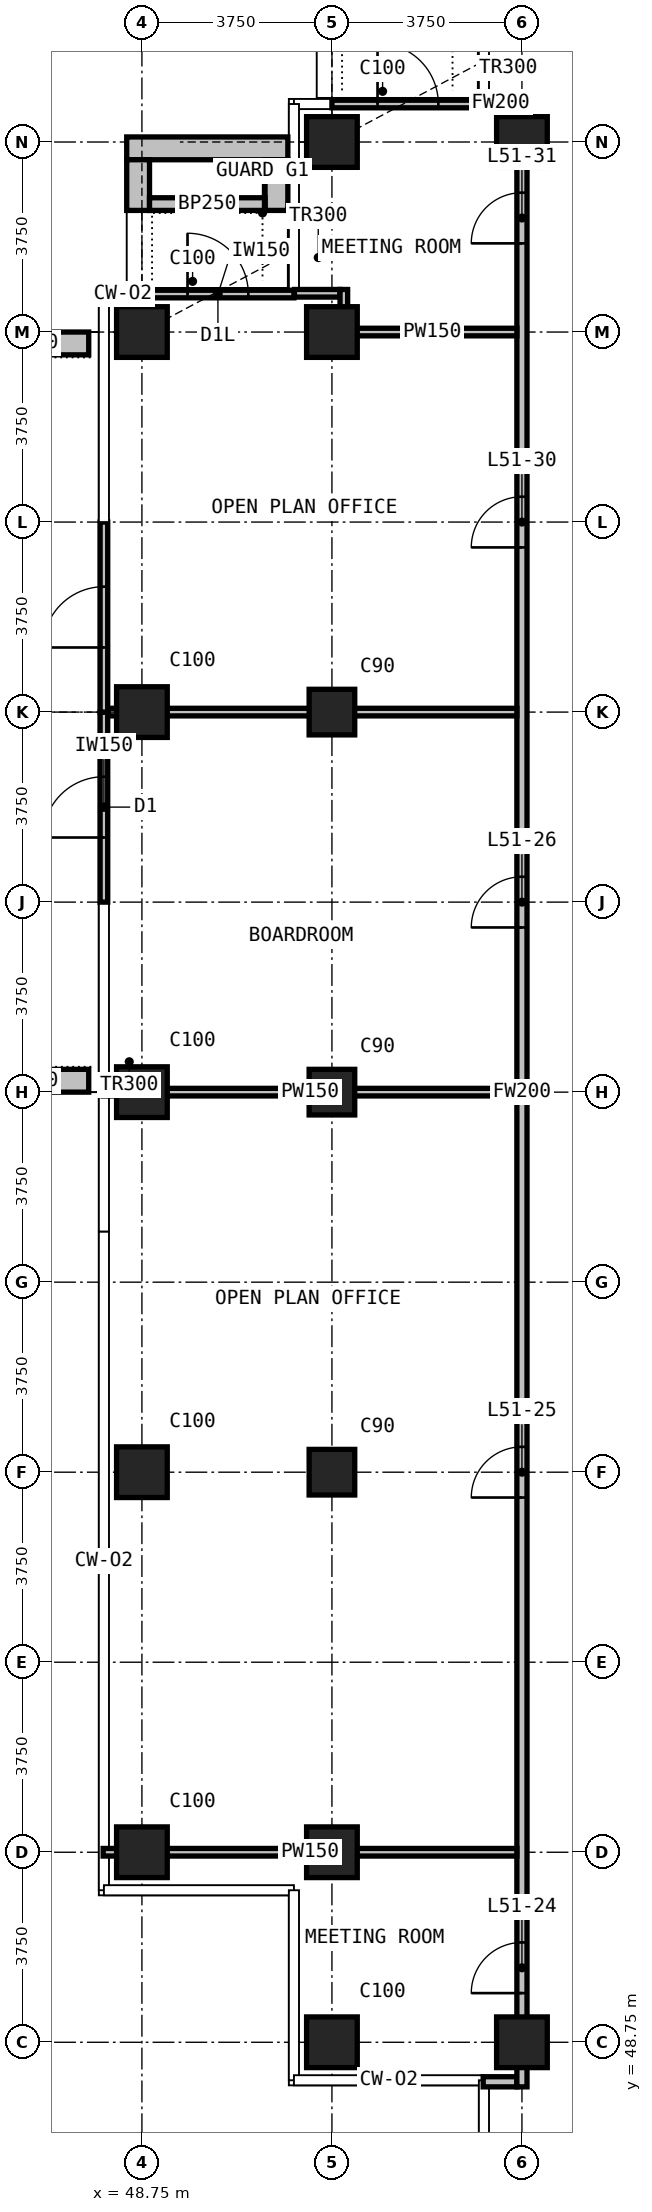
"""IFC4 building model, lengths in metres.
Left out: names, types, materials, properties, quantities, classifications, styles, units other than length and angle.
Written with IfcOpenShell. Run it as: python <this file> out.ifc"""

import sys

from ifc_helpers import new_model, si_unit, direction, frame, frame_2d, origin, origin_2d, place, context, subcontext, project, spatial, rectangle, extrude, element, fill, save


model = new_model("IFC4")
c1 = context("Model", 3, precision=1e-05, world=origin(), true_north=direction((0.0, 1.0)))
c2 = subcontext(c1, "Body", "Model", "MODEL_VIEW")
j1 = project(units=[si_unit("LENGTHUNIT", "METRE"), si_unit("PLANEANGLEUNIT", "RADIAN")], contexts=[c1])
p1 = place(None, origin())
s1 = spatial("IfcSite", under=j1, at=p1, CompositionType="ELEMENT")
p2 = place(p1, origin())
s2 = spatial("IfcBuilding", under=s1, at=p2, CompositionType="ELEMENT")
p3 = place(p2, frame((0.0, 0.0, 199.5)))
s3 = spatial("IfcBuildingStorey", under=s2, at=p3, CompositionType="ELEMENT", Elevation=199.5)
for number, where, z_axis, x_axis in (
    (1, (48.75, 52.5, 0.0), (0.0, 0.0, 1.0), (1.0, 0.0, 0.0)),
    (2, (48.75, 60.0, 0.0), (0.0, 0.0, 1.0), (1.0, 0.0, 0.0)),
    (3, (48.75, 67.5, 0.0), (0.0, 0.0, 1.0), (1.0, 0.0, 0.0)),
    (4, (48.75, 75.0, 0.0), (0.0, 0.0, 1.0), (1.0, 0.0, 0.0)),
    (5, (48.75, 82.5, 0.0), (0.0, 0.0, 1.0), (1.0, 0.0, 0.0)),
    (6, (52.5, 48.75, 0.0), (0.0, 0.0, 1.0), (1.0, 0.0, 0.0)),
    (7, (52.5, 52.5, 0.0), (0.0, 0.0, 1.0), (1.0, 0.0, 0.0)),
):
    element("IfcColumn", number, at=place(p3, frame(where, z_axis=z_axis, x_axis=x_axis)), inside=s3, PredefinedType="COLUMN", context=c2, shape_type="SweptSolid", body=[
        extrude(rectangle(XDim=1.0, YDim=1.0, at=origin_2d()), origin(), (0.0, 0.0, 1.0), 3.6),
    ])
for number, where, z_axis, x_axis in (
    (8, (52.5, 60.0, 0.0), (0.0, 0.0, 1.0), (1.0, 0.0, 0.0)),
    (9, (52.5, 67.5, 0.0), (0.0, 0.0, 1.0), (1.0, 0.0, 0.0)),
    (10, (52.5, 75.0, 0.0), (0.0, 0.0, 1.0), (1.0, 0.0, 0.0)),
):
    element("IfcColumn", number, at=place(p3, frame(where, z_axis=z_axis, x_axis=x_axis)), inside=s3, PredefinedType="COLUMN", context=c2, shape_type="SweptSolid", body=[
        extrude(rectangle(XDim=0.9, YDim=0.9, at=origin_2d()), origin(), (0.0, 0.0, 1.0), 3.6),
    ])
for number, where, z_axis, x_axis in (
    (11, (52.5, 82.5, 0.0), (0.0, 0.0, 1.0), (1.0, 0.0, 0.0)),
    (12, (52.5, 86.25, 0.0), (0.0, 0.0, 1.0), (1.0, 0.0, 0.0)),
    (13, (56.25, 48.75, 0.0), (0.0, 0.0, 1.0), (1.0, 0.0, 0.0)),
    (14, (56.25, 86.25, 0.0), (0.0, 0.0, 1.0), (1.0, 0.0, 0.0)),
):
    element("IfcColumn", number, at=place(p3, frame(where, z_axis=z_axis, x_axis=x_axis)), inside=s3, PredefinedType="COLUMN", context=c2, shape_type="SweptSolid", body=[
        extrude(rectangle(XDim=1.0, YDim=1.0, at=origin_2d()), origin(), (0.0, 0.0, 1.0), 3.6),
    ])
p4 = place(p3, frame((52.5, 87.0, 0.0), z_axis=(0.0, 0.0, 1.0), x_axis=(1.0, 0.0, 0.0)))
e15 = element("IfcWall", 15, at=p4, inside=s3, PredefinedType="SOLIDWALL", context=c2, shape_type="SweptSolid", body=[
    extrude(rectangle(XDim=3.0, YDim=0.15, at=frame_2d((1.5, 0.0))), origin(), (0.0, 0.0, 1.0), 3.3),
])
p5 = place(p4, frame((0.9, 0.0, 0.0)))
e16 = element("IfcOpeningElement", 16, at=p5, cuts=e15, PredefinedType="OPENING", context=c2, shape_type="SweptSolid", body=[
    extrude(rectangle(XDim=1.2, YDim=2.0, at=frame_2d((0.6, 1.0))), frame((0.0, 0.085, 0.0), z_axis=(0.0, -1.0, 0.0), x_axis=(1.0, 0.0, 0.0)), (0.0, 0.0, 1.0), 0.17),
])
p6 = place(p3, frame((48.75, 83.25, 0.0), z_axis=(0.0, 0.0, 1.0), x_axis=(1.0, 0.0, 0.0)))
e17 = element("IfcWall", 17, at=p6, inside=s3, PredefinedType="SOLIDWALL", context=c2, shape_type="SweptSolid", body=[
    extrude(rectangle(XDim=3.0, YDim=0.15, at=frame_2d((1.5, 0.0))), origin(), (0.0, 0.0, 1.0), 3.3),
])
p7 = place(p6, frame((0.9, 0.0, 0.0)))
e18 = element("IfcOpeningElement", 18, at=p7, cuts=e17, PredefinedType="OPENING", context=c2, shape_type="SweptSolid", body=[
    extrude(rectangle(XDim=1.2, YDim=2.0, at=frame_2d((0.6, 1.0))), frame((0.0, 0.085, 0.0), z_axis=(0.0, -1.0, 0.0), x_axis=(1.0, 0.0, 0.0)), (0.0, 0.0, 1.0), 0.17),
])
p8 = place(p3, frame((48.0, 71.25, 0.0), z_axis=(0.0, 0.0, 1.0), x_axis=(0.0, 1.0, 0.0)))
e19 = element("IfcWall", 19, at=p8, inside=s3, PredefinedType="SOLIDWALL", context=c2, shape_type="SweptSolid", body=[
    extrude(rectangle(XDim=3.75, YDim=0.15, at=frame_2d((1.875, 0.0))), origin(), (0.0, 0.0, 1.0), 3.3),
])
p9 = place(p8, frame((1.275, 0.0, 0.0)))
e20 = element("IfcOpeningElement", 20, at=p9, cuts=e19, PredefinedType="OPENING", context=c2, shape_type="SweptSolid", body=[
    extrude(rectangle(XDim=1.2, YDim=2.4, at=frame_2d((0.6, 1.2))), frame((0.0, 0.085, 0.0), z_axis=(0.0, -1.0, 0.0), x_axis=(1.0, 0.0, 0.0)), (0.0, 0.0, 1.0), 0.17),
])
p10 = place(p3, frame((48.0, 75.0, 0.0), z_axis=(0.0, 0.0, 1.0), x_axis=(0.0, 1.0, 0.0)))
e21 = element("IfcWall", 21, at=p10, inside=s3, PredefinedType="SOLIDWALL", context=c2, shape_type="SweptSolid", body=[
    extrude(rectangle(XDim=3.75, YDim=0.15, at=frame_2d((1.875, 0.0))), origin(), (0.0, 0.0, 1.0), 3.3),
])
p11 = place(p10, frame((1.275, 0.0, 0.0)))
e22 = element("IfcOpeningElement", 22, at=p11, cuts=e21, PredefinedType="OPENING", context=c2, shape_type="SweptSolid", body=[
    extrude(rectangle(XDim=1.2, YDim=2.4, at=frame_2d((0.6, 1.2))), frame((0.0, 0.085, 0.0), z_axis=(0.0, -1.0, 0.0), x_axis=(1.0, 0.0, 0.0)), (0.0, 0.0, 1.0), 0.17),
])
p12 = place(p3, frame((48.45, 86.125, 0.0), z_axis=(0.0, 0.0, 1.0), x_axis=(1.0, 0.0, 0.0)))
e23 = element("IfcWall", 23, at=p12, inside=s3, PredefinedType="USERDEFINED", context=c2, shape_type="SweptSolid", body=[
    extrude(rectangle(XDim=3.18, YDim=0.45, at=frame_2d((1.59, 0.0))), origin(), (0.0, 0.0, 1.0), 1.1),
])
for number, where, z_axis, x_axis in (
    (24, (48.675, 84.9, 0.0), (0.0, 0.0, 1.0), (0.0, 1.0, 0.0)),
    (25, (51.405, 84.9, 0.0), (0.0, 0.0, 1.0), (0.0, 1.0, 0.0)),
):
    element("IfcWall", number, at=place(p3, frame(where, z_axis=z_axis, x_axis=x_axis)), inside=s3, PredefinedType="USERDEFINED", context=c2, shape_type="SweptSolid", body=[
        extrude(rectangle(XDim=1.0, YDim=0.45, at=frame_2d((0.5, 0.0))), origin(), (0.0, 0.0, 1.0), 1.1),
    ])
p13 = place(p3, frame((48.9, 85.025, 0.0), z_axis=(0.0, 0.0, 1.0), x_axis=(1.0, 0.0, 0.0)))
e26 = element("IfcWall", 26, at=p13, inside=s3, PredefinedType="USERDEFINED", context=c2, shape_type="SweptSolid", body=[
    extrude(rectangle(XDim=2.28, YDim=0.25, at=frame_2d((1.14, 0.0))), origin(), (0.0, 0.0, 1.0), 1.0),
])
for number, where, z_axis, x_axis in (
    (27, (47.7, 67.725, 0.0), (0.0, 0.0, 1.0), (-1.0, 0.0, 0.0)),
    (28, (47.7, 82.275, 0.0), (0.0, 0.0, 1.0), (-1.0, 0.0, 0.0)),
):
    element("IfcWall", number, at=place(p3, frame(where, z_axis=z_axis, x_axis=x_axis)), inside=s3, PredefinedType="USERDEFINED", context=c2, shape_type="SweptSolid", body=[
        extrude(rectangle(XDim=2.35, YDim=0.45, at=frame_2d((1.175, 0.0))), origin(), (0.0, 0.0, 1.0), 1.1),
    ])
p14 = place(p3, frame((55.485, 47.97, 0.0), z_axis=(0.0, 0.0, 1.0), x_axis=(1.0, 0.0, 0.0)))
e29 = element("IfcWall", 29, at=p14, inside=s3, PredefinedType="PARTITIONING", context=c2, shape_type="SweptSolid", body=[
    extrude(rectangle(XDim=0.665, YDim=0.2, at=frame_2d((0.333, 0.0))), origin(), (0.0, 0.0, 1.0), 3.3),
])
p15 = place(p3, frame((55.51, 87.03, 0.0), z_axis=(0.0, 0.0, 1.0), x_axis=(1.0, 0.0, 0.0)))
e30 = element("IfcWall", 30, at=p15, inside=s3, PredefinedType="PARTITIONING", context=c2, shape_type="SweptSolid", body=[
    extrude(rectangle(XDim=0.64, YDim=0.2, at=frame_2d((0.32, 0.0))), origin(), (0.0, 0.0, 1.0), 3.3),
])
p16 = place(p3, frame((56.25, 47.87, 0.0), z_axis=(0.0, 0.0, 1.0), x_axis=(0.0, 1.0, 0.0)))
e31 = element("IfcWall", 31, at=p16, inside=s3, PredefinedType="PARTITIONING", context=c2, shape_type="SweptSolid", body=[
    extrude(rectangle(XDim=39.26, YDim=0.2, at=frame_2d((19.63, 0.0))), origin(), (0.0, 0.0, 1.0), 3.3),
])
p17 = place(p16, frame((1.85, 0.0, 0.0)))
e32 = element("IfcOpeningElement", 32, at=p17, cuts=e31, PredefinedType="OPENING", context=c2, shape_type="SweptSolid", body=[
    extrude(rectangle(XDim=1.0, YDim=2.2, at=frame_2d((0.5, 1.1))), frame((0.0, 0.11, 0.0), z_axis=(0.0, -1.0, 0.0), x_axis=(1.0, 0.0, 0.0)), (0.0, 0.0, 1.0), 0.22),
])
p18 = place(p16, frame((11.63, 0.0, 0.0)))
e33 = element("IfcOpeningElement", 33, at=p18, cuts=e31, PredefinedType="OPENING", context=c2, shape_type="SweptSolid", body=[
    extrude(rectangle(XDim=1.0, YDim=2.2, at=frame_2d((0.5, 1.1))), frame((0.0, 0.11, 0.0), z_axis=(0.0, -1.0, 0.0), x_axis=(1.0, 0.0, 0.0)), (0.0, 0.0, 1.0), 0.22),
])
p19 = place(p16, frame((22.88, 0.0, 0.0)))
e34 = element("IfcOpeningElement", 34, at=p19, cuts=e31, PredefinedType="OPENING", context=c2, shape_type="SweptSolid", body=[
    extrude(rectangle(XDim=1.0, YDim=2.2, at=frame_2d((0.5, 1.1))), frame((0.0, 0.11, 0.0), z_axis=(0.0, -1.0, 0.0), x_axis=(1.0, 0.0, 0.0)), (0.0, 0.0, 1.0), 0.22),
])
p20 = place(p16, frame((30.38, 0.0, 0.0)))
e35 = element("IfcOpeningElement", 35, at=p20, cuts=e31, PredefinedType="OPENING", context=c2, shape_type="SweptSolid", body=[
    extrude(rectangle(XDim=1.0, YDim=2.2, at=frame_2d((0.5, 1.1))), frame((0.0, 0.11, 0.0), z_axis=(0.0, -1.0, 0.0), x_axis=(1.0, 0.0, 0.0)), (0.0, 0.0, 1.0), 0.22),
])
p21 = place(p16, frame((36.38, 0.0, 0.0)))
e36 = element("IfcOpeningElement", 36, at=p21, cuts=e31, PredefinedType="OPENING", context=c2, shape_type="SweptSolid", body=[
    extrude(rectangle(XDim=1.0, YDim=2.2, at=frame_2d((0.5, 1.1))), frame((0.0, 0.11, 0.0), z_axis=(0.0, -1.0, 0.0), x_axis=(1.0, 0.0, 0.0)), (0.0, 0.0, 1.0), 0.22),
])
for number, where, z_axis, x_axis in (
    (37, (47.985, 52.5, 0.0), (0.0, 0.0, 1.0), (1.0, 0.0, 0.0)),
    (38, (47.985, 67.5, 0.0), (0.0, 0.0, 1.0), (1.0, 0.0, 0.0)),
):
    element("IfcWall", number, at=place(p3, frame(where, z_axis=z_axis, x_axis=x_axis)), inside=s3, PredefinedType="PARTITIONING", context=c2, shape_type="SweptSolid", body=[
        extrude(rectangle(XDim=8.165, YDim=0.15, at=frame_2d((4.083, 0.0))), origin(), (0.0, 0.0, 1.0), 3.3),
    ])
p22 = place(p3, frame((48.085, 75.0, 0.0), z_axis=(0.0, 0.0, 1.0), x_axis=(1.0, 0.0, 0.0)))
e39 = element("IfcWall", 39, at=p22, inside=s3, PredefinedType="PARTITIONING", context=c2, shape_type="SweptSolid", body=[
    extrude(rectangle(XDim=8.065, YDim=0.15, at=frame_2d((4.032, 0.0))), origin(), (0.0, 0.0, 1.0), 3.3),
])
p23 = place(p3, frame((52.81, 82.5, 0.0), z_axis=(0.0, 0.0, 1.0), x_axis=(1.0, 0.0, 0.0)))
e40 = element("IfcWall", 40, at=p23, inside=s3, PredefinedType="PARTITIONING", context=c2, shape_type="SweptSolid", body=[
    extrude(rectangle(XDim=3.34, YDim=0.15, at=frame_2d((1.67, 0.0))), origin(), (0.0, 0.0, 1.0), 3.3),
])
p24 = place(p3, frame((51.76, 83.265, 0.0), z_axis=(0.0, 0.0, 1.0), x_axis=(1.0, 0.0, 0.0)))
e41 = element("IfcWall", 41, at=p24, inside=s3, PredefinedType="PARTITIONING", context=c2, shape_type="SweptSolid", body=[
    extrude(rectangle(XDim=0.9, YDim=0.15, at=frame_2d((0.45, 0.0))), origin(), (0.0, 0.0, 1.0), 3.3),
])
p25 = place(p3, frame((52.735, 82.425, 0.0), z_axis=(0.0, 0.0, 1.0), x_axis=(0.0, 1.0, 0.0)))
e42 = element("IfcWall", 42, at=p25, inside=s3, PredefinedType="PARTITIONING", context=c2, shape_type="SweptSolid", body=[
    extrude(rectangle(XDim=0.915, YDim=0.15, at=frame_2d((0.458, 0.0))), origin(), (0.0, 0.0, 1.0), 3.3),
])
p26 = place(p5, origin())
e43 = element("IfcDoor", 43, at=p26, inside=s3, OperationType="SINGLE_SWING_LEFT", PredefinedType="DOOR", context=c2, shape_type="SweptSolid", body=[
    extrude(rectangle(XDim=1.2, YDim=2.0, at=frame_2d((0.6, 1.0))), frame((0.0, 0.025, 0.0), z_axis=(0.0, -1.0, 0.0), x_axis=(1.0, 0.0, 0.0)), (0.0, 0.0, 1.0), 0.05),
])
fill(e16, e43)
p27 = place(p7, origin())
e44 = element("IfcDoor", 44, at=p27, inside=s3, OperationType="SINGLE_SWING_LEFT", PredefinedType="DOOR", context=c2, shape_type="SweptSolid", body=[
    extrude(rectangle(XDim=1.2, YDim=2.0, at=frame_2d((0.6, 1.0))), frame((0.0, 0.025, 0.0), z_axis=(0.0, -1.0, 0.0), x_axis=(1.0, 0.0, 0.0)), (0.0, 0.0, 1.0), 0.05),
])
fill(e18, e44)
p28 = place(p9, origin())
e45 = element("IfcDoor", 45, at=p28, inside=s3, OperationType="SINGLE_SWING_LEFT", PredefinedType="DOOR", context=c2, shape_type="SweptSolid", body=[
    extrude(rectangle(XDim=1.2, YDim=2.4, at=frame_2d((0.6, 1.2))), frame((0.0, 0.025, 0.0), z_axis=(0.0, -1.0, 0.0), x_axis=(1.0, 0.0, 0.0)), (0.0, 0.0, 1.0), 0.05),
])
fill(e20, e45)
p29 = place(p11, origin())
e46 = element("IfcDoor", 46, at=p29, inside=s3, OperationType="SINGLE_SWING_LEFT", PredefinedType="DOOR", context=c2, shape_type="SweptSolid", body=[
    extrude(rectangle(XDim=1.2, YDim=2.4, at=frame_2d((0.6, 1.2))), frame((0.0, 0.025, 0.0), z_axis=(0.0, -1.0, 0.0), x_axis=(1.0, 0.0, 0.0)), (0.0, 0.0, 1.0), 0.05),
])
fill(e22, e46)
p30 = place(p17, origin())
e47 = element("IfcDoor", 47, at=p30, inside=s3, OperationType="SINGLE_SWING_LEFT", PredefinedType="DOOR", context=c2, shape_type="SweptSolid", body=[
    extrude(rectangle(XDim=1.0, YDim=2.2, at=frame_2d((0.5, 1.1))), frame((0.0, 0.025, 0.0), z_axis=(0.0, -1.0, 0.0), x_axis=(1.0, 0.0, 0.0)), (0.0, 0.0, 1.0), 0.05),
])
fill(e32, e47)
p31 = place(p18, origin())
e48 = element("IfcDoor", 48, at=p31, inside=s3, OperationType="SINGLE_SWING_LEFT", PredefinedType="DOOR", context=c2, shape_type="SweptSolid", body=[
    extrude(rectangle(XDim=1.0, YDim=2.2, at=frame_2d((0.5, 1.1))), frame((0.0, 0.025, 0.0), z_axis=(0.0, -1.0, 0.0), x_axis=(1.0, 0.0, 0.0)), (0.0, 0.0, 1.0), 0.05),
])
fill(e33, e48)
p32 = place(p19, origin())
e49 = element("IfcDoor", 49, at=p32, inside=s3, OperationType="SINGLE_SWING_LEFT", PredefinedType="DOOR", context=c2, shape_type="SweptSolid", body=[
    extrude(rectangle(XDim=1.0, YDim=2.2, at=frame_2d((0.5, 1.1))), frame((0.0, 0.025, 0.0), z_axis=(0.0, -1.0, 0.0), x_axis=(1.0, 0.0, 0.0)), (0.0, 0.0, 1.0), 0.05),
])
fill(e34, e49)
p33 = place(p20, origin())
e50 = element("IfcDoor", 50, at=p33, inside=s3, OperationType="SINGLE_SWING_LEFT", PredefinedType="DOOR", context=c2, shape_type="SweptSolid", body=[
    extrude(rectangle(XDim=1.0, YDim=2.2, at=frame_2d((0.5, 1.1))), frame((0.0, 0.025, 0.0), z_axis=(0.0, -1.0, 0.0), x_axis=(1.0, 0.0, 0.0)), (0.0, 0.0, 1.0), 0.05),
])
fill(e35, e50)
p34 = place(p21, origin())
e51 = element("IfcDoor", 51, at=p34, inside=s3, OperationType="SINGLE_SWING_LEFT", PredefinedType="DOOR", context=c2, shape_type="SweptSolid", body=[
    extrude(rectangle(XDim=1.0, YDim=2.2, at=frame_2d((0.5, 1.1))), frame((0.0, 0.025, 0.0), z_axis=(0.0, -1.0, 0.0), x_axis=(1.0, 0.0, 0.0)), (0.0, 0.0, 1.0), 0.05),
])
fill(e36, e51)
save(model, sys.argv[1])
